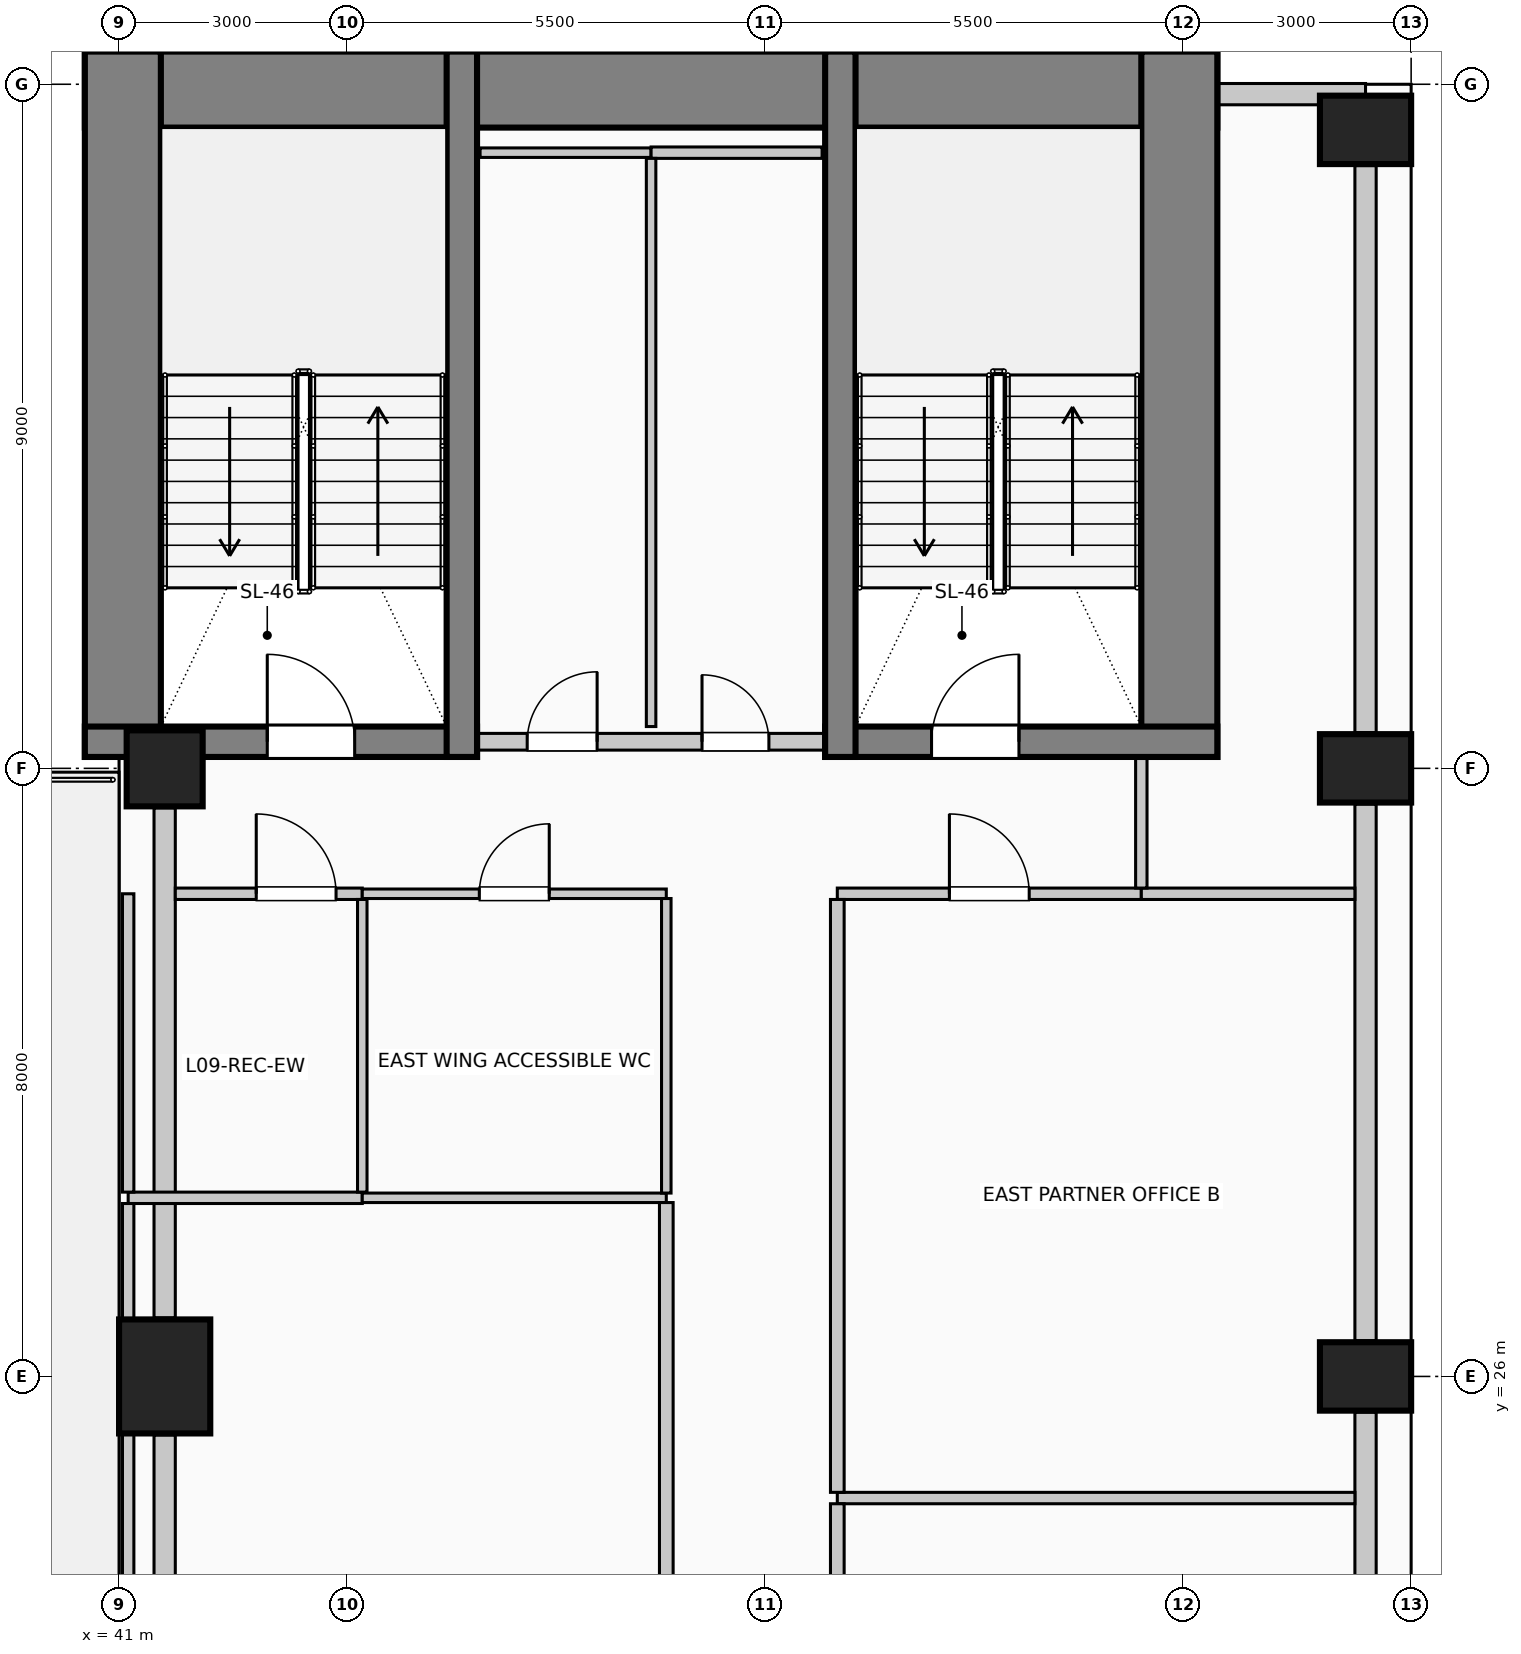
"""IFC4 building model, lengths in metres.
Left out: names, types, materials, properties, quantities, classifications, styles, units other than length and angle.
Written with IfcOpenShell. Run it as: python <this file> out.ifc"""

import sys

from ifc_helpers import new_model, si_unit, direction, frame, frame_2d, origin, origin_2d, place, context, subcontext, project, spatial, rectangle, circle, extrude, element, fill, save


model = new_model("IFC4")
c1 = context("Model", 3, precision=1e-05, world=origin(), true_north=direction((0.0, 1.0)))
c2 = subcontext(c1, "Body", "Model", "MODEL_VIEW")
j1 = project(units=[si_unit("LENGTHUNIT", "METRE"), si_unit("PLANEANGLEUNIT", "RADIAN")], contexts=[c1])
p1 = place(None, origin())
s1 = spatial("IfcSite", under=j1, at=p1, CompositionType="ELEMENT")
p2 = place(p1, origin())
s2 = spatial("IfcBuilding", under=s1, at=p2, CompositionType="ELEMENT")
p3 = place(p2, frame((0.0, 0.0, 38.6)))
s3 = spatial("IfcBuildingStorey", under=s2, at=p3, CompositionType="ELEMENT", Elevation=38.6)
p4 = place(p3, frame((40.55, 42.93, 0.0), z_axis=(0.0, 0.0, 1.0), x_axis=(1.0, 0.0, 0.0)))
e1 = element("IfcWall", 1, at=p4, inside=s3, PredefinedType="SHEAR", context=c2, shape_type="SweptSolid", body=[
    extrude(rectangle(XDim=14.9, YDim=1.0, at=frame_2d((7.45, 0.0))), origin(), (0.0, 0.0, 1.0), 4.0),
])
for number, where, z_axis, x_axis in (
    (2, (41.05, 34.15, 0.0), (0.0, 0.0, 1.0), (0.0, 1.0, 0.0)),
    (3, (54.95, 34.15, 0.0), (0.0, 0.0, 1.0), (0.0, 1.0, 0.0)),
):
    element("IfcWall", number, at=place(p3, frame(where, z_axis=z_axis, x_axis=x_axis)), inside=s3, PredefinedType="SHEAR", context=c2, shape_type="SweptSolid", body=[
        extrude(rectangle(XDim=9.28, YDim=1.0, at=frame_2d((4.64, 0.0))), origin(), (0.0, 0.0, 1.0), 4.0),
    ])
p5 = place(p3, frame((40.55, 34.35, 0.0), z_axis=(0.0, 0.0, 1.0), x_axis=(1.0, 0.0, 0.0)))
e4 = element("IfcWall", 4, at=p5, inside=s3, PredefinedType="SHEAR", context=c2, shape_type="SweptSolid", body=[
    extrude(rectangle(XDim=5.16, YDim=0.4, at=frame_2d((2.58, 0.0))), origin(), (0.0, 0.0, 1.0), 4.0),
])
p6 = place(p5, frame((2.4, 0.0, 0.0)))
e5 = element("IfcOpeningElement", 5, at=p6, cuts=e4, PredefinedType="OPENING", context=c2, shape_type="SweptSolid", body=[
    extrude(rectangle(XDim=1.15, YDim=2.2, at=frame_2d((0.575, 1.1))), frame((0.0, 0.21, 0.0), z_axis=(0.0, -1.0, 0.0), x_axis=(1.0, 0.0, 0.0)), (0.0, 0.0, 1.0), 0.42),
])
p7 = place(p3, frame((45.51, 34.15, 0.0), z_axis=(0.0, 0.0, 1.0), x_axis=(0.0, 1.0, 0.0)))
e6 = element("IfcWall", 6, at=p7, inside=s3, PredefinedType="SHEAR", context=c2, shape_type="SweptSolid", body=[
    extrude(rectangle(XDim=9.28, YDim=0.4, at=frame_2d((4.64, 0.0))), origin(), (0.0, 0.0, 1.0), 4.0),
])
p8 = place(p3, frame((50.29, 34.35, 0.0), z_axis=(0.0, 0.0, 1.0), x_axis=(1.0, 0.0, 0.0)))
e7 = element("IfcWall", 7, at=p8, inside=s3, PredefinedType="SHEAR", context=c2, shape_type="SweptSolid", body=[
    extrude(rectangle(XDim=5.16, YDim=0.4, at=frame_2d((2.58, 0.0))), origin(), (0.0, 0.0, 1.0), 4.0),
])
p9 = place(p8, frame((1.4, 0.0, 0.0)))
e8 = element("IfcOpeningElement", 8, at=p9, cuts=e7, PredefinedType="OPENING", context=c2, shape_type="SweptSolid", body=[
    extrude(rectangle(XDim=1.15, YDim=2.2, at=frame_2d((0.575, 1.1))), frame((0.0, 0.21, 0.0), z_axis=(0.0, -1.0, 0.0), x_axis=(1.0, 0.0, 0.0)), (0.0, 0.0, 1.0), 0.42),
])
p10 = place(p3, frame((50.49, 34.15, 0.0), z_axis=(0.0, 0.0, 1.0), x_axis=(0.0, 1.0, 0.0)))
e9 = element("IfcWall", 9, at=p10, inside=s3, PredefinedType="SHEAR", context=c2, shape_type="SweptSolid", body=[
    extrude(rectangle(XDim=9.28, YDim=0.4, at=frame_2d((4.64, 0.0))), origin(), (0.0, 0.0, 1.0), 4.0),
])
for number, where, z_axis, x_axis in (
    (10, (57.4, 26.0, 0.0), (0.0, 0.0, 1.0), (0.0, 1.0, 0.0)),
    (11, (57.4, 34.0, 0.0), (0.0, 0.0, 1.0), (0.0, 1.0, 0.0)),
    (12, (57.4, 42.4, 0.0), (0.0, 0.0, 1.0), (0.0, 1.0, 0.0)),
):
    element("IfcColumn", number, at=place(p3, frame(where, z_axis=z_axis, x_axis=x_axis)), inside=s3, PredefinedType="COLUMN", context=c2, shape_type="SweptSolid", body=[
        extrude(rectangle(XDim=0.9, YDim=1.2, at=origin_2d()), origin(), (0.0, 0.0, 1.0), 4.0),
    ])
p11 = place(p3, frame((41.6, 26.0, 0.0), z_axis=(0.0, 0.0, 1.0), x_axis=(1.0, 0.0, 0.0)))
e13 = element("IfcColumn", 13, at=p11, inside=s3, PredefinedType="COLUMN", context=c2, shape_type="SweptSolid", body=[
    extrude(rectangle(XDim=1.2, YDim=1.5, at=origin_2d()), origin(), (0.0, 0.0, 1.0), 4.0),
])
p12 = place(p3, frame((41.6, 34.0, 0.0), z_axis=(0.0, 0.0, 1.0), x_axis=(1.0, 0.0, 0.0)))
e14 = element("IfcColumn", 14, at=p12, inside=s3, PredefinedType="COLUMN", context=c2, shape_type="SweptSolid", body=[
    extrude(circle(Radius=0.5, at=origin_2d()), origin(), (0.0, 0.0, 1.0), 4.0),
])
for number, where, z_axis, x_axis in (
    (15, (57.4, 25.53, 0.0), (0.0, 0.0, 1.0), (0.0, -1.0, 0.0)),
    (16, (57.4, 33.53, 0.0), (0.0, 0.0, 1.0), (0.0, -1.0, 0.0)),
):
    element("IfcWall", number, at=place(p3, frame(where, z_axis=z_axis, x_axis=x_axis)), inside=s3, PredefinedType="SOLIDWALL", context=c2, shape_type="SweptSolid", body=[
        extrude(rectangle(XDim=7.06, YDim=0.28, at=frame_2d((3.53, 0.0))), origin(), (0.0, 0.0, 1.0), 2.85),
    ])
p13 = place(p3, frame((57.4, 41.93, 0.0), z_axis=(0.0, 0.0, 1.0), x_axis=(0.0, -1.0, 0.0)))
e17 = element("IfcWall", 17, at=p13, inside=s3, PredefinedType="SOLIDWALL", context=c2, shape_type="SweptSolid", body=[
    extrude(rectangle(XDim=7.46, YDim=0.28, at=frame_2d((3.73, 0.0))), origin(), (0.0, 0.0, 1.0), 2.85),
])
p14 = place(p3, frame((55.455, 42.87, 0.0), z_axis=(0.0, 0.0, 1.0), x_axis=(1.0, 0.0, 0.0)))
e18 = element("IfcWall", 18, at=p14, inside=s3, PredefinedType="SOLIDWALL", context=c2, shape_type="SweptSolid", body=[
    extrude(rectangle(XDim=1.945, YDim=0.28, at=frame_2d((0.972, 0.0))), origin(), (0.0, 0.0, 1.0), 3.7),
])
p15 = place(p3, frame((41.6, 18.77, 0.0), z_axis=(0.0, 0.0, 1.0), x_axis=(0.0, 1.0, 0.0)))
e19 = element("IfcWall", 19, at=p15, inside=s3, PredefinedType="SOLIDWALL", context=c2, shape_type="SweptSolid", body=[
    extrude(rectangle(XDim=6.46, YDim=0.28, at=frame_2d((3.23, 0.0))), origin(), (0.0, 0.0, 1.0), 3.0),
])
p16 = place(p3, frame((41.6, 26.77, 0.0), z_axis=(0.0, 0.0, 1.0), x_axis=(0.0, 1.0, 0.0)))
e20 = element("IfcWall", 20, at=p16, inside=s3, PredefinedType="SOLIDWALL", context=c2, shape_type="SweptSolid", body=[
    extrude(rectangle(XDim=6.71, YDim=0.28, at=frame_2d((3.355, 0.0))), origin(), (0.0, 0.0, 1.0), 3.0),
])
p17 = place(p3, frame((45.72, 34.35, 0.0), z_axis=(0.0, 0.0, 1.0), x_axis=(1.0, 0.0, 0.0)))
e21 = element("IfcWall", 21, at=p17, inside=s3, PredefinedType="PARTITIONING", context=c2, shape_type="SweptSolid", body=[
    extrude(rectangle(XDim=4.56, YDim=0.22, at=frame_2d((2.28, 0.0))), origin(), (0.0, 0.0, 1.0), 3.7),
])
p18 = place(p17, frame((0.65, 0.0, 0.0)))
e22 = element("IfcOpeningElement", 22, at=p18, cuts=e21, PredefinedType="OPENING", context=c2, shape_type="SweptSolid", body=[
    extrude(rectangle(XDim=0.92, YDim=2.1, at=frame_2d((0.46, 1.05))), frame((0.0, 0.12, 0.0), z_axis=(0.0, -1.0, 0.0), x_axis=(1.0, 0.0, 0.0)), (0.0, 0.0, 1.0), 0.24),
])
p19 = place(p17, frame((2.95, 0.0, 0.0)))
e23 = element("IfcOpeningElement", 23, at=p19, cuts=e21, PredefinedType="OPENING", context=c2, shape_type="SweptSolid", body=[
    extrude(rectangle(XDim=0.88, YDim=2.1, at=frame_2d((0.44, 1.05))), frame((0.0, 0.12, 0.0), z_axis=(0.0, -1.0, 0.0), x_axis=(1.0, 0.0, 0.0)), (0.0, 0.0, 1.0), 0.24),
])
p20 = place(p3, frame((50.45, 24.4, 0.0), z_axis=(0.0, 0.0, 1.0), x_axis=(1.0, 0.0, 0.0)))
e24 = element("IfcWall", 24, at=p20, inside=s3, PredefinedType="PARTITIONING", context=c2, shape_type="SweptSolid", body=[
    extrude(rectangle(XDim=6.81, YDim=0.15, at=frame_2d((3.405, 0.0))), origin(), (0.0, 0.0, 1.0), 3.7),
])
p21 = place(p3, frame((41.12, 28.35, 0.0), z_axis=(0.0, 0.0, 1.0), x_axis=(1.0, 0.0, 0.0)))
e25 = element("IfcWall", 25, at=p21, inside=s3, PredefinedType="PARTITIONING", context=c2, shape_type="SweptSolid", body=[
    extrude(rectangle(XDim=3.08, YDim=0.15, at=frame_2d((1.54, 0.0))), origin(), (0.0, 0.0, 1.0), 3.7),
])
p22 = place(p3, frame((44.2, 28.35, 0.0), z_axis=(0.0, 0.0, 1.0), x_axis=(1.0, 0.0, 0.0)))
e26 = element("IfcWall", 26, at=p22, inside=s3, PredefinedType="PARTITIONING", context=c2, shape_type="SweptSolid", body=[
    extrude(rectangle(XDim=4.0, YDim=0.125, at=frame_2d((2.0, 0.0))), origin(), (0.0, 0.0, 1.0), 3.7),
])
p23 = place(p3, frame((41.74, 32.35, 0.0), z_axis=(0.0, 0.0, 1.0), x_axis=(1.0, 0.0, 0.0)))
e27 = element("IfcWall", 27, at=p23, inside=s3, PredefinedType="PARTITIONING", context=c2, shape_type="SweptSolid", body=[
    extrude(rectangle(XDim=2.46, YDim=0.15, at=frame_2d((1.23, 0.0))), origin(), (0.0, 0.0, 1.0), 3.7),
])
p24 = place(p23, frame((1.065, 0.0, 0.0)))
e28 = element("IfcOpeningElement", 28, at=p24, cuts=e27, PredefinedType="OPENING", context=c2, shape_type="SweptSolid", body=[
    extrude(rectangle(XDim=1.05, YDim=2.15, at=frame_2d((0.525, 1.075))), frame((0.0, 0.085, 0.0), z_axis=(0.0, -1.0, 0.0), x_axis=(1.0, 0.0, 0.0)), (0.0, 0.0, 1.0), 0.17),
])
p25 = place(p3, frame((44.2, 32.35, 0.0), z_axis=(0.0, 0.0, 1.0), x_axis=(1.0, 0.0, 0.0)))
e29 = element("IfcWall", 29, at=p25, inside=s3, PredefinedType="PARTITIONING", context=c2, shape_type="SweptSolid", body=[
    extrude(rectangle(XDim=4.0, YDim=0.125, at=frame_2d((2.0, 0.0))), origin(), (0.0, 0.0, 1.0), 3.7),
])
p26 = place(p25, frame((1.54, 0.0, 0.0)))
e30 = element("IfcOpeningElement", 30, at=p26, cuts=e29, PredefinedType="OPENING", context=c2, shape_type="SweptSolid", body=[
    extrude(rectangle(XDim=0.92, YDim=2.1, at=frame_2d((0.46, 1.05))), frame((0.0, 0.073, 0.0), z_axis=(0.0, -1.0, 0.0), x_axis=(1.0, 0.0, 0.0)), (0.0, 0.0, 1.0), 0.145),
])
p27 = place(p3, frame((50.45, 32.35, 0.0), z_axis=(0.0, 0.0, 1.0), x_axis=(1.0, 0.0, 0.0)))
e31 = element("IfcWall", 31, at=p27, inside=s3, PredefinedType="PARTITIONING", context=c2, shape_type="SweptSolid", body=[
    extrude(rectangle(XDim=4.0, YDim=0.15, at=frame_2d((2.0, 0.0))), origin(), (0.0, 0.0, 1.0), 3.7),
])
p28 = place(p27, frame((1.475, 0.0, 0.0)))
e32 = element("IfcOpeningElement", 32, at=p28, cuts=e31, PredefinedType="OPENING", context=c2, shape_type="SweptSolid", body=[
    extrude(rectangle(XDim=1.05, YDim=2.15, at=frame_2d((0.525, 1.075))), frame((0.0, 0.085, 0.0), z_axis=(0.0, -1.0, 0.0), x_axis=(1.0, 0.0, 0.0)), (0.0, 0.0, 1.0), 0.17),
])
p29 = place(p3, frame((54.45, 32.35, 0.0), z_axis=(0.0, 0.0, 1.0), x_axis=(1.0, 0.0, 0.0)))
e33 = element("IfcWall", 33, at=p29, inside=s3, PredefinedType="PARTITIONING", context=c2, shape_type="SweptSolid", body=[
    extrude(rectangle(XDim=2.81, YDim=0.15, at=frame_2d((1.405, 0.0))), origin(), (0.0, 0.0, 1.0), 3.7),
])
p30 = place(p3, frame((45.75, 42.1, 0.0), z_axis=(0.0, 0.0, 1.0), x_axis=(1.0, 0.0, 0.0)))
e34 = element("IfcWall", 34, at=p30, inside=s3, PredefinedType="PARTITIONING", context=c2, shape_type="SweptSolid", body=[
    extrude(rectangle(XDim=2.25, YDim=0.125, at=frame_2d((1.125, 0.0))), origin(), (0.0, 0.0, 1.0), 3.7),
])
p31 = place(p3, frame((48.0, 42.1, 0.0), z_axis=(0.0, 0.0, 1.0), x_axis=(1.0, 0.0, 0.0)))
e35 = element("IfcWall", 35, at=p31, inside=s3, PredefinedType="PARTITIONING", context=c2, shape_type="SweptSolid", body=[
    extrude(rectangle(XDim=2.25, YDim=0.15, at=frame_2d((1.125, 0.0))), origin(), (0.0, 0.0, 1.0), 3.7),
])
p32 = place(p3, frame((41.12, 18.75, 0.0), z_axis=(0.0, 0.0, 1.0), x_axis=(0.0, 1.0, 0.0)))
e36 = element("IfcWall", 36, at=p32, inside=s3, PredefinedType="PARTITIONING", context=c2, shape_type="SweptSolid", body=[
    extrude(rectangle(XDim=6.5, YDim=0.15, at=frame_2d((3.25, 0.0))), origin(), (0.0, 0.0, 1.0), 3.7),
])
p33 = place(p3, frame((41.12, 26.75, 0.0), z_axis=(0.0, 0.0, 1.0), x_axis=(0.0, 1.0, 0.0)))
e37 = element("IfcWall", 37, at=p33, inside=s3, PredefinedType="PARTITIONING", context=c2, shape_type="SweptSolid", body=[
    extrude(rectangle(XDim=1.525, YDim=0.15, at=frame_2d((0.762, 0.0))), origin(), (0.0, 0.0, 1.0), 3.7),
])
p34 = place(p3, frame((41.12, 28.425, 0.0), z_axis=(0.0, 0.0, 1.0), x_axis=(0.0, 1.0, 0.0)))
e38 = element("IfcWall", 38, at=p34, inside=s3, PredefinedType="PARTITIONING", context=c2, shape_type="SweptSolid", body=[
    extrude(rectangle(XDim=3.925, YDim=0.15, at=frame_2d((1.962, 0.0))), origin(), (0.0, 0.0, 1.0), 3.7),
])
p35 = place(p3, frame((44.2, 28.425, 0.0), z_axis=(0.0, 0.0, 1.0), x_axis=(0.0, 1.0, 0.0)))
e39 = element("IfcWall", 39, at=p35, inside=s3, PredefinedType="PARTITIONING", context=c2, shape_type="SweptSolid", body=[
    extrude(rectangle(XDim=3.85, YDim=0.125, at=frame_2d((1.925, 0.0))), origin(), (0.0, 0.0, 1.0), 3.7),
])
p36 = place(p3, frame((48.0, 34.55, 0.0), z_axis=(0.0, 0.0, 1.0), x_axis=(0.0, 1.0, 0.0)))
e40 = element("IfcWall", 40, at=p36, inside=s3, PredefinedType="PARTITIONING", context=c2, shape_type="SweptSolid", body=[
    extrude(rectangle(XDim=7.475, YDim=0.125, at=frame_2d((3.737, 0.0))), origin(), (0.0, 0.0, 1.0), 3.7),
])
p37 = place(p3, frame((48.2, 15.875, 0.0), z_axis=(0.0, 0.0, 1.0), x_axis=(0.0, 1.0, 0.0)))
e41 = element("IfcWall", 41, at=p37, inside=s3, PredefinedType="PARTITIONING", context=c2, shape_type="SweptSolid", body=[
    extrude(rectangle(XDim=12.413, YDim=0.18, at=frame_2d((6.206, 0.0))), origin(), (0.0, 0.0, 1.0), 3.7),
])
p38 = place(p37, frame((5.731, 0.0, 0.0)))
e42 = element("IfcOpeningElement", 42, at=p38, cuts=e41, PredefinedType="OPENING", context=c2, shape_type="SweptSolid", body=[
    extrude(rectangle(XDim=0.95, YDim=2.15, at=frame_2d((0.475, 1.075))), frame((0.0, 0.1, 0.0), z_axis=(0.0, -1.0, 0.0), x_axis=(1.0, 0.0, 0.0)), (0.0, 0.0, 1.0), 0.2),
])
p39 = place(p3, frame((48.2, 28.413, 0.0), z_axis=(0.0, 0.0, 1.0), x_axis=(0.0, 1.0, 0.0)))
e43 = element("IfcWall", 43, at=p39, inside=s3, PredefinedType="PARTITIONING", context=c2, shape_type="SweptSolid", body=[
    extrude(rectangle(XDim=3.875, YDim=0.125, at=frame_2d((1.938, 0.0))), origin(), (0.0, 0.0, 1.0), 3.7),
])
p40 = place(p3, frame((50.45, 16.475, 0.0), z_axis=(0.0, 0.0, 1.0), x_axis=(0.0, 1.0, 0.0)))
e44 = element("IfcWall", 44, at=p40, inside=s3, PredefinedType="PARTITIONING", context=c2, shape_type="SweptSolid", body=[
    extrude(rectangle(XDim=7.85, YDim=0.18, at=frame_2d((3.925, 0.0))), origin(), (0.0, 0.0, 1.0), 3.7),
])
p41 = place(p40, frame((3.4, 0.0, 0.0)))
e45 = element("IfcOpeningElement", 45, at=p41, cuts=e44, PredefinedType="OPENING", context=c2, shape_type="SweptSolid", body=[
    extrude(rectangle(XDim=1.05, YDim=2.15, at=frame_2d((0.525, 1.075))), frame((0.0, 0.1, 0.0), z_axis=(0.0, -1.0, 0.0), x_axis=(1.0, 0.0, 0.0)), (0.0, 0.0, 1.0), 0.2),
])
p42 = place(p3, frame((50.45, 24.475, 0.0), z_axis=(0.0, 0.0, 1.0), x_axis=(0.0, 1.0, 0.0)))
e46 = element("IfcWall", 46, at=p42, inside=s3, PredefinedType="PARTITIONING", context=c2, shape_type="SweptSolid", body=[
    extrude(rectangle(XDim=7.8, YDim=0.18, at=frame_2d((3.9, 0.0))), origin(), (0.0, 0.0, 1.0), 3.7),
])
p43 = place(p3, frame((54.45, 32.425, 0.0), z_axis=(0.0, 0.0, 1.0), x_axis=(0.0, 1.0, 0.0)))
e47 = element("IfcWall", 47, at=p43, inside=s3, PredefinedType="PARTITIONING", context=c2, shape_type="SweptSolid", body=[
    extrude(rectangle(XDim=1.725, YDim=0.15, at=frame_2d((0.862, 0.0))), origin(), (0.0, 0.0, 1.0), 3.7),
])
p44 = place(p6, origin())
e48 = element("IfcDoor", 48, at=p44, inside=s3, OperationType="SINGLE_SWING_LEFT", PredefinedType="DOOR", context=c2, shape_type="SweptSolid", body=[
    extrude(rectangle(XDim=1.15, YDim=2.2, at=frame_2d((0.575, 1.1))), frame((0.0, 0.025, 0.0), z_axis=(0.0, -1.0, 0.0), x_axis=(1.0, 0.0, 0.0)), (0.0, 0.0, 1.0), 0.05),
])
fill(e5, e48)
p45 = place(p18, origin())
e49 = element("IfcDoor", 49, at=p45, inside=s3, OperationType="SINGLE_SWING_RIGHT", PredefinedType="DOOR", context=c2, shape_type="SweptSolid", body=[
    extrude(rectangle(XDim=0.92, YDim=2.1, at=frame_2d((0.46, 1.05))), frame((0.0, 0.025, 0.0), z_axis=(0.0, -1.0, 0.0), x_axis=(1.0, 0.0, 0.0)), (0.0, 0.0, 1.0), 0.05),
])
fill(e22, e49)
p46 = place(p19, origin())
e50 = element("IfcDoor", 50, at=p46, inside=s3, OperationType="SINGLE_SWING_LEFT", PredefinedType="DOOR", context=c2, shape_type="SweptSolid", body=[
    extrude(rectangle(XDim=0.88, YDim=2.1, at=frame_2d((0.44, 1.05))), frame((0.0, 0.025, 0.0), z_axis=(0.0, -1.0, 0.0), x_axis=(1.0, 0.0, 0.0)), (0.0, 0.0, 1.0), 0.05),
])
fill(e23, e50)
p47 = place(p9, origin())
e51 = element("IfcDoor", 51, at=p47, inside=s3, OperationType="SINGLE_SWING_RIGHT", PredefinedType="DOOR", context=c2, shape_type="SweptSolid", body=[
    extrude(rectangle(XDim=1.15, YDim=2.2, at=frame_2d((0.575, 1.1))), frame((0.0, 0.025, 0.0), z_axis=(0.0, -1.0, 0.0), x_axis=(1.0, 0.0, 0.0)), (0.0, 0.0, 1.0), 0.05),
])
fill(e8, e51)
p48 = place(p24, origin())
e52 = element("IfcDoor", 52, at=p48, inside=s3, OperationType="SINGLE_SWING_LEFT", PredefinedType="DOOR", context=c2, shape_type="SweptSolid", body=[
    extrude(rectangle(XDim=1.05, YDim=2.15, at=frame_2d((0.525, 1.075))), frame((0.0, 0.025, 0.0), z_axis=(0.0, -1.0, 0.0), x_axis=(1.0, 0.0, 0.0)), (0.0, 0.0, 1.0), 0.05),
])
fill(e28, e52)
p49 = place(p26, origin())
e53 = element("IfcDoor", 53, at=p49, inside=s3, OperationType="SINGLE_SWING_RIGHT", PredefinedType="DOOR", context=c2, shape_type="SweptSolid", body=[
    extrude(rectangle(XDim=0.92, YDim=2.1, at=frame_2d((0.46, 1.05))), frame((0.0, 0.025, 0.0), z_axis=(0.0, -1.0, 0.0), x_axis=(1.0, 0.0, 0.0)), (0.0, 0.0, 1.0), 0.05),
])
fill(e30, e53)
p50 = place(p28, origin())
e54 = element("IfcDoor", 54, at=p50, inside=s3, OperationType="SINGLE_SWING_LEFT", PredefinedType="DOOR", context=c2, shape_type="SweptSolid", body=[
    extrude(rectangle(XDim=1.05, YDim=2.15, at=frame_2d((0.525, 1.075))), frame((0.0, 0.025, 0.0), z_axis=(0.0, -1.0, 0.0), x_axis=(1.0, 0.0, 0.0)), (0.0, 0.0, 1.0), 0.05),
])
fill(e32, e54)
save(model, sys.argv[1])
